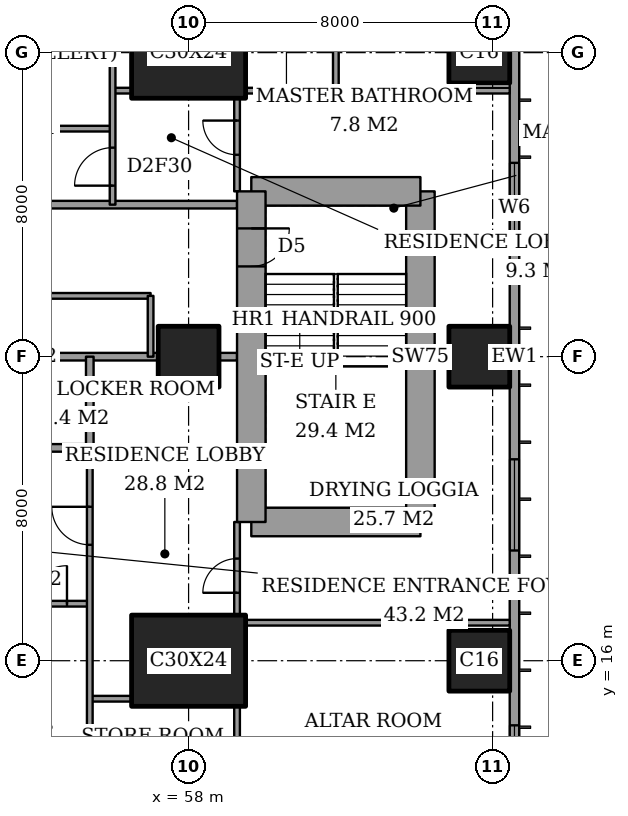
"""IFC4 building model, lengths in metres.
Left out: names, types, materials, properties, quantities, classifications, styles, units other than length and angle.
Written with IfcOpenShell. Run it as: python <this file> out.ifc"""

import sys

from ifc_helpers import new_model, si_unit, direction, frame, frame_2d, origin, origin_2d, place, context, subcontext, project, spatial, rectangle, extrude, element, fill, save


model = new_model("IFC4")
c1 = context("Model", 3, precision=1e-05, world=origin(), true_north=direction((0.0, 1.0)))
c2 = subcontext(c1, "Body", "Model", "MODEL_VIEW")
j1 = project(units=[si_unit("LENGTHUNIT", "METRE"), si_unit("PLANEANGLEUNIT", "RADIAN")], contexts=[c1])
p1 = place(None, origin())
s1 = spatial("IfcSite", under=j1, at=p1, CompositionType="ELEMENT")
p2 = place(p1, origin())
s2 = spatial("IfcBuilding", under=s1, at=p2, CompositionType="ELEMENT")
p3 = place(p2, frame((0.0, 0.0, 230.4)))
s3 = spatial("IfcBuildingStorey", under=s2, at=p3, CompositionType="ELEMENT", Elevation=230.4)
p4 = place(p3, frame((58.0, 16.0, 0.0), z_axis=(0.0, 0.0, 1.0), x_axis=(1.0, 0.0, 0.0)))
e1 = element("IfcColumn", 1, at=p4, inside=s3, PredefinedType="COLUMN", context=c2, shape_type="SweptSolid", body=[
    extrude(rectangle(XDim=3.0, YDim=2.4, at=origin_2d()), origin(), (0.0, 0.0, 1.0), 3.6),
])
p5 = place(p3, frame((58.0, 24.0, 0.0), z_axis=(0.0, 0.0, 1.0), x_axis=(1.0, 0.0, 0.0)))
e2 = element("IfcColumn", 2, at=p5, inside=s3, PredefinedType="COLUMN", context=c2, shape_type="SweptSolid", body=[
    extrude(rectangle(XDim=1.6, YDim=1.6, at=origin_2d()), origin(), (0.0, 0.0, 1.0), 3.6),
])
p6 = place(p3, frame((58.0, 32.0, 0.0), z_axis=(0.0, 0.0, 1.0), x_axis=(1.0, 0.0, 0.0)))
e3 = element("IfcColumn", 3, at=p6, inside=s3, PredefinedType="COLUMN", context=c2, shape_type="SweptSolid", body=[
    extrude(rectangle(XDim=3.0, YDim=2.4, at=origin_2d()), origin(), (0.0, 0.0, 1.0), 3.6),
])
for number, where, z_axis, x_axis in (
    (4, (65.65, 16.0, 0.0), (0.0, 0.0, 1.0), (1.0, 0.0, 0.0)),
    (5, (65.65, 24.0, 0.0), (0.0, 0.0, 1.0), (1.0, 0.0, 0.0)),
    (6, (65.65, 32.0, 0.0), (0.0, 0.0, 1.0), (1.0, 0.0, 0.0)),
):
    element("IfcColumn", number, at=place(p3, frame(where, z_axis=z_axis, x_axis=x_axis)), inside=s3, PredefinedType="COLUMN", context=c2, shape_type="SweptSolid", body=[
        extrude(rectangle(XDim=1.6, YDim=1.6, at=origin_2d()), origin(), (0.0, 0.0, 1.0), 3.6),
    ])
p7 = place(p3, frame((59.65, 19.65, 0.0), z_axis=(0.0, 0.0, 1.0), x_axis=(1.0, 0.0, 0.0)))
e7 = element("IfcWall", 7, at=p7, inside=s3, PredefinedType="SHEAR", context=c2, shape_type="SweptSolid", body=[
    extrude(rectangle(XDim=4.45, YDim=0.75, at=frame_2d((2.225, 0.0))), origin(), (0.0, 0.0, 1.0), 3.6),
])
p8 = place(p3, frame((64.1, 19.65, 0.0), z_axis=(0.0, 0.0, 1.0), x_axis=(0.0, 1.0, 0.0)))
e8 = element("IfcWall", 8, at=p8, inside=s3, PredefinedType="SHEAR", context=c2, shape_type="SweptSolid", body=[
    extrude(rectangle(XDim=8.7, YDim=0.75, at=frame_2d((4.35, 0.0))), origin(), (0.0, 0.0, 1.0), 3.6),
])
p9 = place(p3, frame((64.1, 28.35, 0.0), z_axis=(0.0, 0.0, 1.0), x_axis=(-1.0, 0.0, 0.0)))
e9 = element("IfcWall", 9, at=p9, inside=s3, PredefinedType="SHEAR", context=c2, shape_type="SweptSolid", body=[
    extrude(rectangle(XDim=4.45, YDim=0.75, at=frame_2d((2.225, 0.0))), origin(), (0.0, 0.0, 1.0), 3.6),
])
p10 = place(p3, frame((59.65, 28.35, 0.0), z_axis=(0.0, 0.0, 1.0), x_axis=(0.0, -1.0, 0.0)))
e10 = element("IfcWall", 10, at=p10, inside=s3, PredefinedType="SHEAR", context=c2, shape_type="SweptSolid", body=[
    extrude(rectangle(XDim=8.7, YDim=0.75, at=frame_2d((4.35, 0.0))), origin(), (0.0, 0.0, 1.0), 3.6),
])
p11 = place(p10, frame((0.975, 0.0, 0.0)))
e11 = element("IfcOpeningElement", 11, at=p11, cuts=e10, PredefinedType="OPENING", context=c2, shape_type="SweptSolid", body=[
    extrude(rectangle(XDim=1.0, YDim=2.1, at=frame_2d((0.5, 1.05))), frame((0.0, 0.385, 0.0), z_axis=(0.0, -1.0, 0.0), x_axis=(1.0, 0.0, 0.0)), (0.0, 0.0, 1.0), 0.77),
])
p12 = place(p3, frame((66.575, 3.175, 0.0), z_axis=(0.0, 0.0, 1.0), x_axis=(0.0, 1.0, 0.0)))
e12 = element("IfcWall", 12, at=p12, inside=s3, PredefinedType="SOLIDWALL", context=c2, shape_type="SweptSolid", body=[
    extrude(rectangle(XDim=41.65, YDim=0.25, at=frame_2d((20.825, 0.0))), origin(), (0.0, 0.0, 1.0), 3.6),
])
p13 = place(p12, frame((0.875, 0.0, 0.6)))
e13 = element("IfcOpeningElement", 13, at=p13, cuts=e12, PredefinedType="OPENING", context=c2, shape_type="SweptSolid", body=[
    extrude(rectangle(XDim=2.4, YDim=2.0, at=frame_2d((1.2, 1.0))), frame((0.0, 0.135, 0.0), z_axis=(0.0, -1.0, 0.0), x_axis=(1.0, 0.0, 0.0)), (0.0, 0.0, 1.0), 0.27),
])
p14 = place(p12, frame((6.225, 0.0, 0.6)))
e14 = element("IfcOpeningElement", 14, at=p14, cuts=e12, PredefinedType="OPENING", context=c2, shape_type="SweptSolid", body=[
    extrude(rectangle(XDim=1.2, YDim=2.0, at=frame_2d((0.6, 1.0))), frame((0.0, 0.135, 0.0), z_axis=(0.0, -1.0, 0.0), x_axis=(1.0, 0.0, 0.0)), (0.0, 0.0, 1.0), 0.27),
])
p15 = place(p12, frame((8.725, 0.0, 0.6)))
e15 = element("IfcOpeningElement", 15, at=p15, cuts=e12, PredefinedType="OPENING", context=c2, shape_type="SweptSolid", body=[
    extrude(rectangle(XDim=2.4, YDim=2.0, at=frame_2d((1.2, 1.0))), frame((0.0, 0.135, 0.0), z_axis=(0.0, -1.0, 0.0), x_axis=(1.0, 0.0, 0.0)), (0.0, 0.0, 1.0), 0.27),
])
p16 = place(p12, frame((15.725, 0.0, 0.6)))
e16 = element("IfcOpeningElement", 16, at=p16, cuts=e12, PredefinedType="OPENING", context=c2, shape_type="SweptSolid", body=[
    extrude(rectangle(XDim=2.4, YDim=2.0, at=frame_2d((1.2, 1.0))), frame((0.0, 0.135, 0.0), z_axis=(0.0, -1.0, 0.0), x_axis=(1.0, 0.0, 0.0)), (0.0, 0.0, 1.0), 0.27),
])
p17 = place(p12, frame((23.525, 0.0, 0.6)))
e17 = element("IfcOpeningElement", 17, at=p17, cuts=e12, PredefinedType="OPENING", context=c2, shape_type="SweptSolid", body=[
    extrude(rectangle(XDim=2.4, YDim=2.0, at=frame_2d((1.2, 1.0))), frame((0.0, 0.135, 0.0), z_axis=(0.0, -1.0, 0.0), x_axis=(1.0, 0.0, 0.0)), (0.0, 0.0, 1.0), 0.27),
])
p18 = place(p12, frame((30.725, 0.0, 0.6)))
e18 = element("IfcOpeningElement", 18, at=p18, cuts=e12, PredefinedType="OPENING", context=c2, shape_type="SweptSolid", body=[
    extrude(rectangle(XDim=2.4, YDim=2.0, at=frame_2d((1.2, 1.0))), frame((0.0, 0.135, 0.0), z_axis=(0.0, -1.0, 0.0), x_axis=(1.0, 0.0, 0.0)), (0.0, 0.0, 1.0), 0.27),
])
p19 = place(p12, frame((34.525, 0.0, 0.6)))
e19 = element("IfcOpeningElement", 19, at=p19, cuts=e12, PredefinedType="OPENING", context=c2, shape_type="SweptSolid", body=[
    extrude(rectangle(XDim=1.2, YDim=2.0, at=frame_2d((0.6, 1.0))), frame((0.0, 0.135, 0.0), z_axis=(0.0, -1.0, 0.0), x_axis=(1.0, 0.0, 0.0)), (0.0, 0.0, 1.0), 0.27),
])
p20 = place(p12, frame((38.375, 0.0, 0.6)))
e20 = element("IfcOpeningElement", 20, at=p20, cuts=e12, PredefinedType="OPENING", context=c2, shape_type="SweptSolid", body=[
    extrude(rectangle(XDim=2.4, YDim=2.0, at=frame_2d((1.2, 1.0))), frame((0.0, 0.135, 0.0), z_axis=(0.0, -1.0, 0.0), x_axis=(1.0, 0.0, 0.0)), (0.0, 0.0, 1.0), 0.27),
])
p21 = place(p3, frame((55.4, 15.0, 0.0), z_axis=(0.0, 0.0, 1.0), x_axis=(1.0, 0.0, 0.0)))
e21 = element("IfcWall", 21, at=p21, inside=s3, PredefinedType="PARTITIONING", context=c2, shape_type="SweptSolid", body=[
    extrude(rectangle(XDim=1.1, YDim=0.15, at=frame_2d((0.55, 0.0))), origin(), (0.0, 0.0, 1.0), 3.35),
])
p22 = place(p3, frame((59.5, 17.0, 0.0), z_axis=(0.0, 0.0, 1.0), x_axis=(1.0, 0.0, 0.0)))
e22 = element("IfcWall", 22, at=p22, inside=s3, PredefinedType="PARTITIONING", context=c2, shape_type="SweptSolid", body=[
    extrude(rectangle(XDim=6.95, YDim=0.15, at=frame_2d((3.475, 0.0))), origin(), (0.0, 0.0, 1.0), 3.35),
])
p23 = place(p3, frame((51.6, 17.5, 0.0), z_axis=(0.0, 0.0, 1.0), x_axis=(1.0, 0.0, 0.0)))
e23 = element("IfcWall", 23, at=p23, inside=s3, PredefinedType="PARTITIONING", context=c2, shape_type="SweptSolid", body=[
    extrude(rectangle(XDim=3.8, YDim=0.15, at=frame_2d((1.9, 0.0))), origin(), (0.0, 0.0, 1.0), 3.35),
])
p24 = place(p23, frame((2.2, 0.0, 0.0)))
e24 = element("IfcOpeningElement", 24, at=p24, cuts=e23, PredefinedType="OPENING", context=c2, shape_type="SweptSolid", body=[
    extrude(rectangle(XDim=1.0, YDim=2.1, at=frame_2d((0.5, 1.05))), frame((0.0, 0.085, 0.0), z_axis=(0.0, -1.0, 0.0), x_axis=(1.0, 0.0, 0.0)), (0.0, 0.0, 1.0), 0.17),
])
p25 = place(p3, frame((51.2, 21.6, 0.0), z_axis=(0.0, 0.0, 1.0), x_axis=(1.0, 0.0, 0.0)))
e25 = element("IfcWall", 25, at=p25, inside=s3, PredefinedType="PARTITIONING", context=c2, shape_type="SweptSolid", body=[
    extrude(rectangle(XDim=4.2, YDim=0.2, at=frame_2d((2.1, 0.0))), origin(), (0.0, 0.0, 1.0), 3.35),
])
p26 = place(p25, frame((1.65, 0.0, 0.0)))
e26 = element("IfcOpeningElement", 26, at=p26, cuts=e25, PredefinedType="OPENING", context=c2, shape_type="SweptSolid", body=[
    extrude(rectangle(XDim=0.9, YDim=2.1, at=frame_2d((0.45, 1.05))), frame((0.0, 0.11, 0.0), z_axis=(0.0, -1.0, 0.0), x_axis=(1.0, 0.0, 0.0)), (0.0, 0.0, 1.0), 0.22),
])
p27 = place(p3, frame((50.8, 24.0, 0.0), z_axis=(0.0, 0.0, 1.0), x_axis=(1.0, 0.0, 0.0)))
e27 = element("IfcWall", 27, at=p27, inside=s3, PredefinedType="PARTITIONING", context=c2, shape_type="SweptSolid", body=[
    extrude(rectangle(XDim=6.4, YDim=0.2, at=frame_2d((3.2, 0.0))), origin(), (0.0, 0.0, 1.0), 3.35),
])
p28 = place(p3, frame((58.8, 24.0, 0.0), z_axis=(0.0, 0.0, 1.0), x_axis=(1.0, 0.0, 0.0)))
e28 = element("IfcWall", 28, at=p28, inside=s3, PredefinedType="PARTITIONING", context=c2, shape_type="SweptSolid", body=[
    extrude(rectangle(XDim=0.475, YDim=0.2, at=frame_2d((0.237, 0.0))), origin(), (0.0, 0.0, 1.0), 3.35),
])
p29 = place(p3, frame((64.475, 24.0, 0.0), z_axis=(0.0, 0.0, 1.0), x_axis=(1.0, 0.0, 0.0)))
e29 = element("IfcWall", 29, at=p29, inside=s3, PredefinedType="PARTITIONING", context=c2, shape_type="SweptSolid", body=[
    extrude(rectangle(XDim=0.375, YDim=0.15, at=frame_2d((0.188, 0.0))), origin(), (0.0, 0.0, 1.0), 3.35),
])
p30 = place(p3, frame((48.6, 25.6, 0.0), z_axis=(0.0, 0.0, 1.0), x_axis=(1.0, 0.0, 0.0)))
e30 = element("IfcWall", 30, at=p30, inside=s3, PredefinedType="PARTITIONING", context=c2, shape_type="SweptSolid", body=[
    extrude(rectangle(XDim=8.4, YDim=0.15, at=frame_2d((4.2, 0.0))), origin(), (0.0, 0.0, 1.0), 3.35),
])
p31 = place(p30, frame((3.75, 0.0, 0.0)))
e31 = element("IfcOpeningElement", 31, at=p31, cuts=e30, PredefinedType="OPENING", context=c2, shape_type="SweptSolid", body=[
    extrude(rectangle(XDim=0.9, YDim=2.1, at=frame_2d((0.45, 1.05))), frame((0.0, 0.085, 0.0), z_axis=(0.0, -1.0, 0.0), x_axis=(1.0, 0.0, 0.0)), (0.0, 0.0, 1.0), 0.17),
])
p32 = place(p3, frame((42.0, 28.0, 0.0), z_axis=(0.0, 0.0, 1.0), x_axis=(1.0, 0.0, 0.0)))
e32 = element("IfcWall", 32, at=p32, inside=s3, PredefinedType="PARTITIONING", context=c2, shape_type="SweptSolid", body=[
    extrude(rectangle(XDim=17.275, YDim=0.2, at=frame_2d((8.637, 0.0))), origin(), (0.0, 0.0, 1.0), 3.35),
])
p33 = place(p32, frame((9.4, 0.0, 0.0)))
e33 = element("IfcOpeningElement", 33, at=p33, cuts=e32, PredefinedType="OPENING", context=c2, shape_type="SweptSolid", body=[
    extrude(rectangle(XDim=1.2, YDim=2.4, at=frame_2d((0.6, 1.2))), frame((0.0, 0.11, 0.0), z_axis=(0.0, -1.0, 0.0), x_axis=(1.0, 0.0, 0.0)), (0.0, 0.0, 1.0), 0.22),
])
p34 = place(p3, frame((51.6, 30.0, 0.0), z_axis=(0.0, 0.0, 1.0), x_axis=(1.0, 0.0, 0.0)))
e34 = element("IfcWall", 34, at=p34, inside=s3, PredefinedType="PARTITIONING", context=c2, shape_type="SweptSolid", body=[
    extrude(rectangle(XDim=4.4, YDim=0.15, at=frame_2d((2.2, 0.0))), origin(), (0.0, 0.0, 1.0), 3.35),
])
p35 = place(p34, frame((0.6, 0.0, 0.0)))
e35 = element("IfcOpeningElement", 35, at=p35, cuts=e34, PredefinedType="OPENING", context=c2, shape_type="SweptSolid", body=[
    extrude(rectangle(XDim=1.0, YDim=2.1, at=frame_2d((0.5, 1.05))), frame((0.0, 0.085, 0.0), z_axis=(0.0, -1.0, 0.0), x_axis=(1.0, 0.0, 0.0)), (0.0, 0.0, 1.0), 0.17),
])
p36 = place(p3, frame((56.0, 31.0, 0.0), z_axis=(0.0, 0.0, 1.0), x_axis=(1.0, 0.0, 0.0)))
e36 = element("IfcWall", 36, at=p36, inside=s3, PredefinedType="PARTITIONING", context=c2, shape_type="SweptSolid", body=[
    extrude(rectangle(XDim=0.5, YDim=0.15, at=frame_2d((0.25, 0.0))), origin(), (0.0, 0.0, 1.0), 3.35),
])
p37 = place(p3, frame((59.5, 31.0, 0.0), z_axis=(0.0, 0.0, 1.0), x_axis=(1.0, 0.0, 0.0)))
e37 = element("IfcWall", 37, at=p37, inside=s3, PredefinedType="PARTITIONING", context=c2, shape_type="SweptSolid", body=[
    extrude(rectangle(XDim=6.95, YDim=0.15, at=frame_2d((3.475, 0.0))), origin(), (0.0, 0.0, 1.0), 3.35),
])
p38 = place(p3, frame((55.4, 21.6, 0.0), z_axis=(0.0, 0.0, 1.0), x_axis=(0.0, 1.0, 0.0)))
e38 = element("IfcWall", 38, at=p38, inside=s3, PredefinedType="PARTITIONING", context=c2, shape_type="SweptSolid", body=[
    extrude(rectangle(XDim=2.4, YDim=0.2, at=frame_2d((1.2, 0.0))), origin(), (0.0, 0.0, 1.0), 3.35),
])
p39 = place(p3, frame((55.4, 11.0, 0.0), z_axis=(0.0, 0.0, 1.0), x_axis=(0.0, 1.0, 0.0)))
e39 = element("IfcWall", 39, at=p39, inside=s3, PredefinedType="PARTITIONING", context=c2, shape_type="SweptSolid", body=[
    extrude(rectangle(XDim=10.6, YDim=0.15, at=frame_2d((5.3, 0.0))), origin(), (0.0, 0.0, 1.0), 3.35),
])
p40 = place(p39, frame((8.05, 0.0, 0.0)))
e40 = element("IfcOpeningElement", 40, at=p40, cuts=e39, PredefinedType="OPENING", context=c2, shape_type="SweptSolid", body=[
    extrude(rectangle(XDim=1.0, YDim=2.1, at=frame_2d((0.5, 1.05))), frame((0.0, 0.085, 0.0), z_axis=(0.0, -1.0, 0.0), x_axis=(1.0, 0.0, 0.0)), (0.0, 0.0, 1.0), 0.17),
])
p41 = place(p3, frame((56.0, 28.0, 0.0), z_axis=(0.0, 0.0, 1.0), x_axis=(0.0, 1.0, 0.0)))
e41 = element("IfcWall", 41, at=p41, inside=s3, PredefinedType="PARTITIONING", context=c2, shape_type="SweptSolid", body=[
    extrude(rectangle(XDim=9.4, YDim=0.15, at=frame_2d((4.7, 0.0))), origin(), (0.0, 0.0, 1.0), 3.35),
])
p42 = place(p41, frame((0.5, 0.0, 0.0)))
e42 = element("IfcOpeningElement", 42, at=p42, cuts=e41, PredefinedType="OPENING", context=c2, shape_type="SweptSolid", body=[
    extrude(rectangle(XDim=1.0, YDim=2.1, at=frame_2d((0.5, 1.05))), frame((0.0, 0.085, 0.0), z_axis=(0.0, -1.0, 0.0), x_axis=(1.0, 0.0, 0.0)), (0.0, 0.0, 1.0), 0.17),
])
p43 = place(p3, frame((57.0, 24.0, 0.0), z_axis=(0.0, 0.0, 1.0), x_axis=(0.0, 1.0, 0.0)))
e43 = element("IfcWall", 43, at=p43, inside=s3, PredefinedType="PARTITIONING", context=c2, shape_type="SweptSolid", body=[
    extrude(rectangle(XDim=1.6, YDim=0.15, at=frame_2d((0.8, 0.0))), origin(), (0.0, 0.0, 1.0), 3.35),
])
p44 = place(p3, frame((59.275, 11.0, 0.0), z_axis=(0.0, 0.0, 1.0), x_axis=(0.0, 1.0, 0.0)))
e44 = element("IfcWall", 44, at=p44, inside=s3, PredefinedType="PARTITIONING", context=c2, shape_type="SweptSolid", body=[
    extrude(rectangle(XDim=3.8, YDim=0.15, at=frame_2d((1.9, 0.0))), origin(), (0.0, 0.0, 1.0), 3.35),
])
p45 = place(p3, frame((59.275, 17.2, 0.0), z_axis=(0.0, 0.0, 1.0), x_axis=(0.0, 1.0, 0.0)))
e45 = element("IfcWall", 45, at=p45, inside=s3, PredefinedType="PARTITIONING", context=c2, shape_type="SweptSolid", body=[
    extrude(rectangle(XDim=2.45, YDim=0.15, at=frame_2d((1.225, 0.0))), origin(), (0.0, 0.0, 1.0), 3.35),
])
p46 = place(p45, frame((0.587, 0.0, 0.0)))
e46 = element("IfcOpeningElement", 46, at=p46, cuts=e45, PredefinedType="OPENING", context=c2, shape_type="SweptSolid", body=[
    extrude(rectangle(XDim=0.9, YDim=2.1, at=frame_2d((0.45, 1.05))), frame((0.0, 0.085, 0.0), z_axis=(0.0, -1.0, 0.0), x_axis=(1.0, 0.0, 0.0)), (0.0, 0.0, 1.0), 0.17),
])
p47 = place(p3, frame((59.275, 28.35, 0.0), z_axis=(0.0, 0.0, 1.0), x_axis=(0.0, 1.0, 0.0)))
e47 = element("IfcWall", 47, at=p47, inside=s3, PredefinedType="PARTITIONING", context=c2, shape_type="SweptSolid", body=[
    extrude(rectangle(XDim=2.45, YDim=0.15, at=frame_2d((1.225, 0.0))), origin(), (0.0, 0.0, 1.0), 3.35),
])
p48 = place(p47, frame((0.962, 0.0, 0.0)))
e48 = element("IfcOpeningElement", 48, at=p48, cuts=e47, PredefinedType="OPENING", context=c2, shape_type="SweptSolid", body=[
    extrude(rectangle(XDim=0.9, YDim=2.1, at=frame_2d((0.45, 1.05))), frame((0.0, 0.085, 0.0), z_axis=(0.0, -1.0, 0.0), x_axis=(1.0, 0.0, 0.0)), (0.0, 0.0, 1.0), 0.17),
])
p49 = place(p3, frame((61.875, 31.0, 0.0), z_axis=(0.0, 0.0, 1.0), x_axis=(0.0, 1.0, 0.0)))
e49 = element("IfcWall", 49, at=p49, inside=s3, PredefinedType="PARTITIONING", context=c2, shape_type="SweptSolid", body=[
    extrude(rectangle(XDim=3.0, YDim=0.15, at=frame_2d((1.5, 0.0))), origin(), (0.0, 0.0, 1.0), 3.35),
])
p50 = place(p49, frame((1.05, 0.0, 0.0)))
e50 = element("IfcOpeningElement", 50, at=p50, cuts=e49, PredefinedType="OPENING", context=c2, shape_type="SweptSolid", body=[
    extrude(rectangle(XDim=0.9, YDim=2.1, at=frame_2d((0.45, 1.05))), frame((0.0, 0.085, 0.0), z_axis=(0.0, -1.0, 0.0), x_axis=(1.0, 0.0, 0.0)), (0.0, 0.0, 1.0), 0.17),
])
p51 = place(p15, origin())
e51 = element("IfcWindow", 51, at=p51, inside=s3, PartitioningType="SINGLE_PANEL", PredefinedType="WINDOW", context=c2, shape_type="SweptSolid", body=[
    extrude(rectangle(XDim=2.4, YDim=2.0, at=frame_2d((1.2, 1.0))), frame((0.0, 0.03, 0.0), z_axis=(0.0, -1.0, 0.0), x_axis=(1.0, 0.0, 0.0)), (0.0, 0.0, 1.0), 0.06),
])
fill(e15, e51)
p52 = place(p16, origin())
e52 = element("IfcWindow", 52, at=p52, inside=s3, PartitioningType="SINGLE_PANEL", PredefinedType="WINDOW", context=c2, shape_type="SweptSolid", body=[
    extrude(rectangle(XDim=2.4, YDim=2.0, at=frame_2d((1.2, 1.0))), frame((0.0, 0.03, 0.0), z_axis=(0.0, -1.0, 0.0), x_axis=(1.0, 0.0, 0.0)), (0.0, 0.0, 1.0), 0.06),
])
fill(e16, e52)
p53 = place(p17, origin())
e53 = element("IfcWindow", 53, at=p53, inside=s3, PartitioningType="SINGLE_PANEL", PredefinedType="WINDOW", context=c2, shape_type="SweptSolid", body=[
    extrude(rectangle(XDim=2.4, YDim=2.0, at=frame_2d((1.2, 1.0))), frame((0.0, 0.03, 0.0), z_axis=(0.0, -1.0, 0.0), x_axis=(1.0, 0.0, 0.0)), (0.0, 0.0, 1.0), 0.06),
])
fill(e17, e53)
p54 = place(p46, origin())
e54 = element("IfcDoor", 54, at=p54, inside=s3, OperationType="SINGLE_SWING_RIGHT", PredefinedType="DOOR", context=c2, shape_type="SweptSolid", body=[
    extrude(rectangle(XDim=0.9, YDim=2.1, at=frame_2d((0.45, 1.05))), frame((0.0, 0.025, 0.0), z_axis=(0.0, -1.0, 0.0), x_axis=(1.0, 0.0, 0.0)), (0.0, 0.0, 1.0), 0.05),
])
fill(e46, e54)
p55 = place(p40, origin())
e55 = element("IfcDoor", 55, at=p55, inside=s3, OperationType="SINGLE_SWING_LEFT", PredefinedType="DOOR", context=c2, shape_type="SweptSolid", body=[
    extrude(rectangle(XDim=1.0, YDim=2.1, at=frame_2d((0.5, 1.05))), frame((0.0, 0.025, 0.0), z_axis=(0.0, -1.0, 0.0), x_axis=(1.0, 0.0, 0.0)), (0.0, 0.0, 1.0), 0.05),
])
fill(e40, e55)
p56 = place(p24, origin())
e56 = element("IfcDoor", 56, at=p56, inside=s3, OperationType="SINGLE_SWING_LEFT", PredefinedType="DOOR", context=c2, shape_type="SweptSolid", body=[
    extrude(rectangle(XDim=1.0, YDim=2.1, at=frame_2d((0.5, 1.05))), frame((0.0, 0.025, 0.0), z_axis=(0.0, -1.0, 0.0), x_axis=(1.0, 0.0, 0.0)), (0.0, 0.0, 1.0), 0.05),
])
fill(e24, e56)
p57 = place(p48, origin())
e57 = element("IfcDoor", 57, at=p57, inside=s3, OperationType="SINGLE_SWING_LEFT", PredefinedType="DOOR", context=c2, shape_type="SweptSolid", body=[
    extrude(rectangle(XDim=0.9, YDim=2.1, at=frame_2d((0.45, 1.05))), frame((0.0, 0.025, 0.0), z_axis=(0.0, -1.0, 0.0), x_axis=(1.0, 0.0, 0.0)), (0.0, 0.0, 1.0), 0.05),
])
fill(e48, e57)
p58 = place(p42, origin())
e58 = element("IfcDoor", 58, at=p58, inside=s3, OperationType="SINGLE_SWING_RIGHT", PredefinedType="DOOR", context=c2, shape_type="SweptSolid", body=[
    extrude(rectangle(XDim=1.0, YDim=2.1, at=frame_2d((0.5, 1.05))), frame((0.0, 0.025, 0.0), z_axis=(0.0, -1.0, 0.0), x_axis=(1.0, 0.0, 0.0)), (0.0, 0.0, 1.0), 0.05),
])
fill(e42, e58)
p59 = place(p11, origin())
e59 = element("IfcDoor", 59, at=p59, inside=s3, OperationType="SINGLE_SWING_RIGHT", PredefinedType="DOOR", context=c2, shape_type="SweptSolid", body=[
    extrude(rectangle(XDim=1.0, YDim=2.1, at=frame_2d((0.5, 1.05))), frame((0.0, 0.025, 0.0), z_axis=(0.0, -1.0, 0.0), x_axis=(1.0, 0.0, 0.0)), (0.0, 0.0, 1.0), 0.05),
])
fill(e11, e59)
save(model, sys.argv[1])
